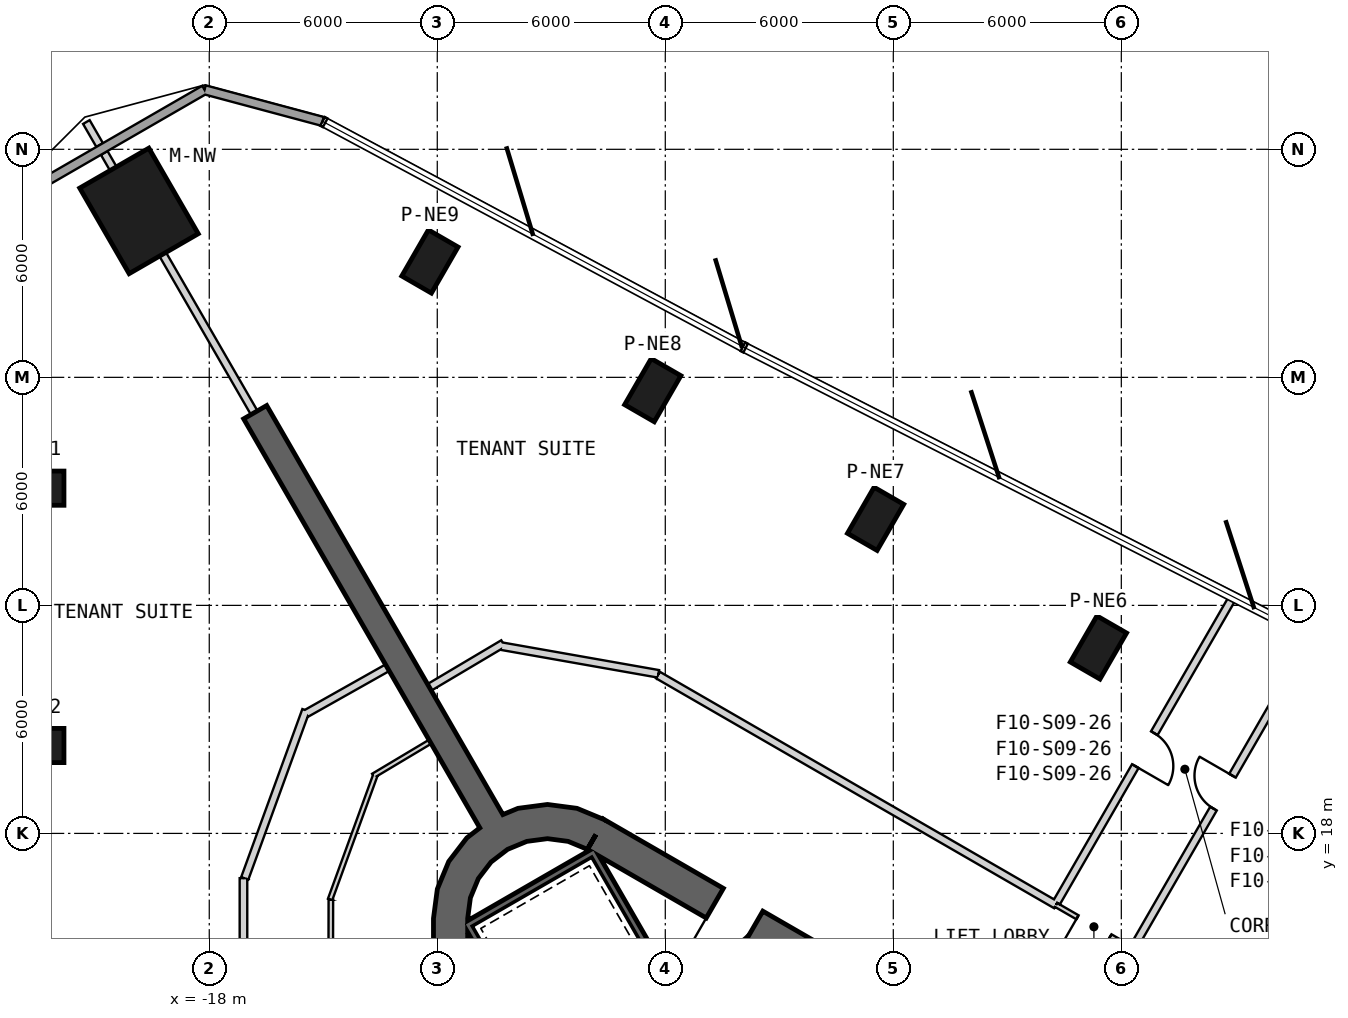
"""IFC4 building model, lengths in metres.
Left out: names, types, materials, properties, quantities, classifications, styles, units other than length and angle.
Written with IfcOpenShell. Run it as: python <this file> out.ifc"""

import sys

from ifc_helpers import new_model, si_unit, direction, frame, frame_2d, origin, origin_2d, place, context, subcontext, project, spatial, polyline, rectangle, outline, extrude, element, fill, save


model = new_model("IFC4")
c1 = context("Model", 3, precision=1e-05, world=origin(), true_north=direction((0.0, 1.0)))
c2 = subcontext(c1, "Body", "Model", "MODEL_VIEW")
j1 = project(units=[si_unit("LENGTHUNIT", "METRE"), si_unit("PLANEANGLEUNIT", "RADIAN")], contexts=[c1])
p1 = place(None, origin())
s1 = spatial("IfcSite", under=j1, at=p1, CompositionType="ELEMENT")
p2 = place(p1, origin())
s2 = spatial("IfcBuilding", under=s1, at=p2, CompositionType="ELEMENT")
p3 = place(p2, frame((0.0, 0.0, 169.2)))
s3 = spatial("IfcBuildingStorey", under=s2, at=p3, CompositionType="ELEMENT", Elevation=169.2)
p4 = place(p3, frame((-19.849, 34.379, 0.0), z_axis=(0.0, 0.0, 1.0), x_axis=(-0.5, 0.866025403784, 0.0)))
e1 = element("IfcColumn", 1, at=p4, inside=s3, PredefinedType="COLUMN", context=c2, shape_type="SweptSolid", body=[
    extrude(rectangle(XDim=2.6, YDim=2.1, at=origin_2d()), origin(), (0.0, 0.0, 1.0), 4.0),
])
for number, where, z_axis, x_axis in (
    (2, (-22.524, 27.084, -0.3), (0.0, 0.0, 1.0), (-1.0, 0.0, 0.0)),
    (3, (-22.524, 20.313, -0.3), (0.0, 0.0, 1.0), (-1.0, 0.0, 0.0)),
    (4, (5.398, 22.892, -0.3), (0.0, 0.0, 1.0), (0.5, 0.866, 0.0)),
    (5, (-0.466, 26.277, -0.3), (0.0, 0.0, 1.0), (0.5, 0.866, 0.0)),
    (6, (-6.33, 29.663, -0.3), (0.0, 0.0, 1.0), (0.5, 0.866, 0.0)),
    (7, (-12.194, 33.048, -0.3), (0.0, 0.0, 1.0), (0.5, 0.866, 0.0)),
):
    element("IfcColumn", number, at=place(p3, frame(where, z_axis=z_axis, x_axis=x_axis)), inside=s3, PredefinedType="COLUMN", context=c2, shape_type="SweptSolid", body=[
        extrude(rectangle(XDim=1.4, YDim=0.9, at=origin_2d()), origin(), (0.0, 0.0, 1.0), 4.3),
    ])
p5 = place(p3, frame((19.475, 2.208, 0.0), z_axis=(0.0, 0.0, 1.0), x_axis=(-0.866028369851, 0.499994862586, 0.0)))
e8 = element("IfcWall", 8, at=p5, inside=s3, PredefinedType="SHEAR", context=c2, shape_type="SweptSolid", body=[
    extrude(rectangle(XDim=31.523, YDim=0.9, at=frame_2d((15.762, 0.0))), origin(), (0.0, 0.0, 1.0), 4.0),
])
p6 = place(p5, frame((7.062, 0.0, 0.0)))
e9 = element("IfcOpeningElement", 9, at=p6, cuts=e8, PredefinedType="OPENING", context=c2, shape_type="SweptSolid", body=[
    extrude(rectangle(XDim=1.2, YDim=2.4, at=frame_2d((0.6, 1.2))), frame((0.0, 0.46, 0.0), z_axis=(0.0, -1.0, 0.0), x_axis=(1.0, 0.0, 0.0)), (0.0, 0.0, 1.0), 0.92),
])
p7 = place(p5, frame((3.612, 0.0, 0.0)))
e10 = element("IfcOpeningElement", 10, at=p7, cuts=e8, PredefinedType="OPENING", context=c2, shape_type="SweptSolid", body=[
    extrude(rectangle(XDim=1.2, YDim=2.4, at=frame_2d((0.6, 1.2))), frame((0.0, 0.46, 0.0), z_axis=(0.0, -1.0, 0.0), x_axis=(1.0, 0.0, 0.0)), (0.0, 0.0, 1.0), 0.92),
])
p8 = place(p5, frame((26.712, 0.0, 0.0)))
e11 = element("IfcOpeningElement", 11, at=p8, cuts=e8, PredefinedType="OPENING", context=c2, shape_type="SweptSolid", body=[
    extrude(rectangle(XDim=1.2, YDim=2.4, at=frame_2d((0.6, 1.2))), frame((0.0, 0.46, 0.0), z_axis=(0.0, -1.0, 0.0), x_axis=(1.0, 0.0, 0.0)), (0.0, 0.0, 1.0), 0.92),
])
p9 = place(p3, frame((-11.65, 15.762, 0.0), z_axis=(0.0, 0.0, 1.0), x_axis=(0.0, -1.0, 0.0)))
e12 = element("IfcWall", 12, at=p9, inside=s3, PredefinedType="SHEAR", context=c2, shape_type="SweptSolid", body=[
    extrude(rectangle(XDim=31.523, YDim=0.9, at=frame_2d((15.762, 0.0))), origin(), (0.0, 0.0, 1.0), 4.0),
])
p10 = place(p9, frame((7.062, 0.0, 0.0)))
e13 = element("IfcOpeningElement", 13, at=p10, cuts=e12, PredefinedType="OPENING", context=c2, shape_type="SweptSolid", body=[
    extrude(rectangle(XDim=1.2, YDim=2.4, at=frame_2d((0.6, 1.2))), frame((0.0, 0.46, 0.0), z_axis=(0.0, -1.0, 0.0), x_axis=(1.0, 0.0, 0.0)), (0.0, 0.0, 1.0), 0.92),
])
p11 = place(p9, frame((9.762, 0.0, 0.0)))
e14 = element("IfcOpeningElement", 14, at=p11, cuts=e12, PredefinedType="OPENING", context=c2, shape_type="SweptSolid", body=[
    extrude(rectangle(XDim=1.2, YDim=2.4, at=frame_2d((0.6, 1.2))), frame((0.0, 0.46, 0.0), z_axis=(0.0, -1.0, 0.0), x_axis=(1.0, 0.0, 0.0)), (0.0, 0.0, 1.0), 0.92),
])
p12 = place(p9, frame((12.462, 0.0, 0.0)))
e15 = element("IfcOpeningElement", 15, at=p12, cuts=e12, PredefinedType="OPENING", context=c2, shape_type="SweptSolid", body=[
    extrude(rectangle(XDim=1.2, YDim=2.4, at=frame_2d((0.6, 1.2))), frame((0.0, 0.46, 0.0), z_axis=(0.0, -1.0, 0.0), x_axis=(1.0, 0.0, 0.0)), (0.0, 0.0, 1.0), 0.92),
])
p13 = place(p9, frame((15.162, 0.0, 0.0)))
e16 = element("IfcOpeningElement", 16, at=p13, cuts=e12, PredefinedType="OPENING", context=c2, shape_type="SweptSolid", body=[
    extrude(rectangle(XDim=1.2, YDim=2.4, at=frame_2d((0.6, 1.2))), frame((0.0, 0.46, 0.0), z_axis=(0.0, -1.0, 0.0), x_axis=(1.0, 0.0, 0.0)), (0.0, 0.0, 1.0), 0.92),
])
p14 = place(p9, frame((17.862, 0.0, 0.0)))
e17 = element("IfcOpeningElement", 17, at=p14, cuts=e12, PredefinedType="OPENING", context=c2, shape_type="SweptSolid", body=[
    extrude(rectangle(XDim=1.2, YDim=2.4, at=frame_2d((0.6, 1.2))), frame((0.0, 0.46, 0.0), z_axis=(0.0, -1.0, 0.0), x_axis=(1.0, 0.0, 0.0)), (0.0, 0.0, 1.0), 0.92),
])
p15 = place(p9, frame((20.562, 0.0, 0.0)))
e18 = element("IfcOpeningElement", 18, at=p15, cuts=e12, PredefinedType="OPENING", context=c2, shape_type="SweptSolid", body=[
    extrude(rectangle(XDim=1.2, YDim=2.4, at=frame_2d((0.6, 1.2))), frame((0.0, 0.46, 0.0), z_axis=(0.0, -1.0, 0.0), x_axis=(1.0, 0.0, 0.0)), (0.0, 0.0, 1.0), 0.92),
])
p16 = place(p9, frame((23.262, 0.0, 0.0)))
e19 = element("IfcOpeningElement", 19, at=p16, cuts=e12, PredefinedType="OPENING", context=c2, shape_type="SweptSolid", body=[
    extrude(rectangle(XDim=1.2, YDim=2.4, at=frame_2d((0.6, 1.2))), frame((0.0, 0.46, 0.0), z_axis=(0.0, -1.0, 0.0), x_axis=(1.0, 0.0, 0.0)), (0.0, 0.0, 1.0), 0.92),
])
p17 = place(p9, frame((3.612, 0.0, 0.0)))
e20 = element("IfcOpeningElement", 20, at=p17, cuts=e12, PredefinedType="OPENING", context=c2, shape_type="SweptSolid", body=[
    extrude(rectangle(XDim=1.2, YDim=2.4, at=frame_2d((0.6, 1.2))), frame((0.0, 0.46, 0.0), z_axis=(0.0, -1.0, 0.0), x_axis=(1.0, 0.0, 0.0)), (0.0, 0.0, 1.0), 0.92),
])
p18 = place(p9, frame((26.712, 0.0, 0.0)))
e21 = element("IfcOpeningElement", 21, at=p18, cuts=e12, PredefinedType="OPENING", context=c2, shape_type="SweptSolid", body=[
    extrude(rectangle(XDim=1.2, YDim=2.4, at=frame_2d((0.6, 1.2))), frame((0.0, 0.46, 0.0), z_axis=(0.0, -1.0, 0.0), x_axis=(1.0, 0.0, 0.0)), (0.0, 0.0, 1.0), 0.92),
])
p19 = place(p3, origin())
e22 = element("IfcWall", 22, at=p19, inside=s3, PredefinedType="SHEAR", context=c2, shape_type="SweptSolid", body=[
    extrude(outline(polyline([(-7.6, 18.36), (-8.323, 18.659), (-9.1, 18.762), (-9.876, 18.659), (-10.6, 18.36), (-11.221, 17.883), (-11.698, 17.262), (-11.998, 16.538), (-12.1, 15.762), (-11.2, 15.762), (-11.128, 16.305), (-10.919, 16.812), (-10.585, 17.247), (-10.15, 17.58), (-9.644, 17.79), (-9.1, 17.862), (-8.556, 17.79), (-8.05, 17.58), (-7.6, 18.36)])), origin(), (0.0, 0.0, 1.0), 4.0),
])
p20 = place(p3, frame((-10.575, 18.316, 0.0), z_axis=(0.0, 0.0, 1.0), x_axis=(-0.499995558535, 0.86602796805, 0.0)))
e23 = element("IfcWall", 23, at=p20, inside=s3, PredefinedType="SHEAR", context=c2, shape_type="SweptSolid", body=[
    extrude(rectangle(XDim=12.433, YDim=0.7, at=frame_2d((6.216, 0.0))), origin(), (0.0, 0.0, 1.0), 4.0),
])
p21 = place(p3, frame((-15.02, 36.735, 0.0), z_axis=(0.0, 0.0, 1.0), x_axis=(-0.965921607741, 0.258834788424, 0.0)))
e24 = element("IfcWall", 24, at=p21, inside=s3, PredefinedType="SOLIDWALL", context=c2, shape_type="SweptSolid", body=[
    extrude(rectangle(XDim=3.215, YDim=0.24, at=frame_2d((1.607, 0.0))), origin(), (0.0, 0.0, 1.0), 3.7),
])
p22 = place(p3, frame((-18.125, 37.567, 0.0), z_axis=(0.0, 0.0, 1.0), x_axis=(-0.866030202489, -0.499991688307, 0.0)))
e25 = element("IfcWall", 25, at=p22, inside=s3, PredefinedType="SOLIDWALL", context=c2, shape_type="SweptSolid", body=[
    extrude(rectangle(XDim=6.175, YDim=0.24, at=frame_2d((3.087, 0.0))), origin(), (0.0, 0.0, 1.0), 3.7),
])
p23 = place(p3, frame((-11.245, 15.678, -0.3), z_axis=(0.0, 0.0, 1.0), x_axis=(0.499977274689, -0.866038523851, 0.0)))
e26 = element("IfcWall", 26, at=p23, inside=s3, PredefinedType="SHEAR", context=c2, shape_type="SweptSolid", body=[
    extrude(rectangle(XDim=8.1, YDim=0.2, at=frame_2d((4.05, 0.0))), origin(), (0.0, 0.0, 1.0), 4.0),
])
p24 = place(p3, frame((-7.818, 17.541, -0.3), z_axis=(0.0, 0.0, 1.0), x_axis=(-0.866044365799, -0.499967155389, 0.0)))
e27 = element("IfcWall", 27, at=p24, inside=s3, PredefinedType="SHEAR", context=c2, shape_type="SweptSolid", body=[
    extrude(rectangle(XDim=3.8, YDim=0.2, at=frame_2d((1.9, 0.0))), origin(), (0.0, 0.0, 1.0), 4.0),
])
p25 = place(p3, frame((-7.854, 17.405, -0.3), z_axis=(0.0, 0.0, 1.0), x_axis=(0.499997992926, -0.866026562566, 0.0)))
e28 = element("IfcWall", 28, at=p25, inside=s3, PredefinedType="SHEAR", context=c2, shape_type="SweptSolid", body=[
    extrude(rectangle(XDim=7.9, YDim=0.2, at=frame_2d((3.95, 0.0))), origin(), (0.0, 0.0, 1.0), 4.0),
])
p26 = place(p3, frame((-12.189, 20.411, 0.0), z_axis=(0.0, 0.0, 1.0), x_axis=(-0.858492721014, -0.51282574815, 0.0)))
e29 = element("IfcWall", 29, at=p26, inside=s3, PredefinedType="PARTITIONING", context=c2, shape_type="SweptSolid", body=[
    extrude(rectangle(XDim=1.742, YDim=0.12, at=frame_2d((0.871, 0.0))), origin(), (0.0, 0.0, 1.0), 3.7),
])
p27 = place(p3, frame((-13.631, 19.53, 0.0), z_axis=(0.0, 0.0, 1.0), x_axis=(-0.342069878069, -0.939674517329, 0.0)))
e30 = element("IfcWall", 30, at=p27, inside=s3, PredefinedType="PARTITIONING", context=c2, shape_type="SweptSolid", body=[
    extrude(rectangle(XDim=3.479, YDim=0.12, at=frame_2d((1.739, 0.0))), origin(), (0.0, 0.0, 1.0), 2.78),
])
p28 = place(p3, frame((-14.8, 16.257, 0.0), z_axis=(0.0, 0.0, 1.0), x_axis=(-0.001847148781, -0.999998294019, 0.0)))
e31 = element("IfcWall", 31, at=p28, inside=s3, PredefinedType="PARTITIONING", context=c2, shape_type="SweptSolid", body=[
    extrude(rectangle(XDim=16.257, YDim=0.12, at=frame_2d((8.128, 0.0))), origin(), (0.0, 0.0, 1.0), 2.88),
])
p29 = place(p28, frame((7.629, 0.0, 0.0)))
e32 = element("IfcOpeningElement", 32, at=p29, cuts=e31, PredefinedType="OPENING", context=c2, shape_type="SweptSolid", body=[
    extrude(rectangle(XDim=1.0, YDim=2.1, at=frame_2d((0.5, 1.05))), frame((0.0, 0.07, 0.0), z_axis=(0.0, -1.0, 0.0), x_axis=(1.0, 0.0, 0.0)), (0.0, 0.0, 1.0), 0.14),
])
p30 = place(p3, frame((-17.1, 16.823, 0.0), z_axis=(0.0, 0.0, 1.0), x_axis=(0.0, -1.0, 0.0)))
e33 = element("IfcWall", 33, at=p30, inside=s3, PredefinedType="PARTITIONING", context=c2, shape_type="SweptSolid", body=[
    extrude(rectangle(XDim=12.473, YDim=0.2, at=frame_2d((6.236, 0.0))), origin(), (0.0, 0.0, 1.0), 2.88),
])
p31 = place(p30, frame((5.776, 0.0, 0.0)))
e34 = element("IfcOpeningElement", 34, at=p31, cuts=e33, PredefinedType="OPENING", context=c2, shape_type="SweptSolid", body=[
    extrude(rectangle(XDim=1.0, YDim=2.1, at=frame_2d((0.5, 1.05))), frame((0.0, 0.11, 0.0), z_axis=(0.0, -1.0, 0.0), x_axis=(1.0, 0.0, 0.0)), (0.0, 0.0, 1.0), 0.22),
])
p32 = place(p3, frame((-15.456, 21.239, 0.0), z_axis=(0.0, 0.0, 1.0), x_axis=(-0.34205546997, -0.939679762187, 0.0)))
e35 = element("IfcWall", 35, at=p32, inside=s3, PredefinedType="PARTITIONING", context=c2, shape_type="SweptSolid", body=[
    extrude(rectangle(XDim=4.706, YDim=0.2, at=frame_2d((2.353, 0.0))), origin(), (0.0, 0.0, 1.0), 2.78),
])
p33 = place(p3, frame((-13.313, 22.359, 0.0), z_axis=(0.0, 0.0, 1.0), x_axis=(-0.87121710687, -0.490897904555, 0.0)))
e36 = element("IfcWall", 36, at=p33, inside=s3, PredefinedType="PARTITIONING", context=c2, shape_type="SweptSolid", body=[
    extrude(rectangle(XDim=2.457, YDim=0.2, at=frame_2d((1.229, 0.0))), origin(), (0.0, 0.0, 1.0), 3.7),
])
p34 = place(p3, frame((6.275, 14.968, 0.0), z_axis=(0.0, 0.0, 1.0), x_axis=(-0.866053019151, 0.499952165731, 0.0)))
e37 = element("IfcWall", 37, at=p34, inside=s3, PredefinedType="PARTITIONING", context=c2, shape_type="SweptSolid", body=[
    extrude(rectangle(XDim=2.3, YDim=0.12, at=frame_2d((1.15, 0.0))), origin(), (0.0, 0.0, 1.0), 3.7),
])
p35 = place(p34, frame((0.65, 0.0, 0.0)))
e38 = element("IfcOpeningElement", 38, at=p35, cuts=e37, PredefinedType="OPENING", context=c2, shape_type="SweptSolid", body=[
    extrude(rectangle(XDim=1.0, YDim=2.1, at=frame_2d((0.5, 1.05))), frame((0.0, 0.07, 0.0), z_axis=(0.0, -1.0, 0.0), x_axis=(1.0, 0.0, 0.0)), (0.0, 0.0, 1.0), 0.14),
])
p36 = place(p3, frame((-10.265, 22.996, 0.0), z_axis=(0.0, 0.0, 1.0), x_axis=(-0.859934823121, -0.510403859687, 0.0)))
e39 = element("IfcWall", 39, at=p36, inside=s3, PredefinedType="PARTITIONING", context=c2, shape_type="SweptSolid", body=[
    extrude(rectangle(XDim=2.258, YDim=0.2, at=frame_2d((1.129, 0.0))), origin(), (0.0, 0.0, 1.0), 3.7),
])
p37 = place(p3, frame((-6.181, 22.199, 0.0), z_axis=(0.0, 0.0, 1.0), x_axis=(-0.984807544765, 0.17364935869, 0.0)))
e40 = element("IfcWall", 40, at=p37, inside=s3, PredefinedType="PARTITIONING", context=c2, shape_type="SweptSolid", body=[
    extrude(rectangle(XDim=4.199, YDim=0.2, at=frame_2d((2.1, 0.0))), origin(), (0.0, 0.0, 1.0), 2.78),
])
p38 = place(p3, frame((4.283, 16.118, 0.0), z_axis=(0.0, 0.0, 1.0), x_axis=(-0.866016186489, 0.500015964484, 0.0)))
e41 = element("IfcWall", 41, at=p38, inside=s3, PredefinedType="PARTITIONING", context=c2, shape_type="SweptSolid", body=[
    extrude(rectangle(XDim=12.096, YDim=0.2, at=frame_2d((6.048, 0.0))), origin(), (0.0, 0.0, 1.0), 2.88),
])
p39 = place(p3, frame((-16.817, 29.068, 0.0), z_axis=(0.0, 0.0, 1.0), x_axis=(-0.499988695522, 0.866031930329, 0.0)))
e42 = element("IfcWall", 42, at=p39, inside=s3, PredefinedType="PARTITIONING", context=c2, shape_type="SweptSolid", body=[
    extrude(rectangle(XDim=4.815, YDim=0.2, at=frame_2d((2.408, 0.0))), origin(), (0.0, 0.0, 1.0), 3.27),
])
p40 = place(p3, frame((-20.525, 35.49, 0.0), z_axis=(0.0, 0.0, 1.0), x_axis=(-0.499869636591, 0.866100656052, 0.0)))
e43 = element("IfcWall", 43, at=p40, inside=s3, PredefinedType="PARTITIONING", context=c2, shape_type="SweptSolid", body=[
    extrude(rectangle(XDim=0.479, YDim=0.2, at=frame_2d((0.239, 0.0))), origin(), (0.0, 0.0, 1.0), 3.7),
])
p41 = place(p3, frame((-20.884, 36.113, 0.0), z_axis=(0.0, 0.0, 1.0), x_axis=(-0.49989369433, 0.866086770693, 0.0)))
e44 = element("IfcWall", 44, at=p41, inside=s3, PredefinedType="PARTITIONING", context=c2, shape_type="SweptSolid", body=[
    extrude(rectangle(XDim=0.699, YDim=0.2, at=frame_2d((0.35, 0.0))), origin(), (0.0, 0.0, 1.0), 3.7),
])
p42 = place(p3, frame((8.941, 24.227, 0.0), z_axis=(0.0, 0.0, 1.0), x_axis=(-0.500002216581, -0.866024124037, 0.0)))
e45 = element("IfcWall", 45, at=p42, inside=s3, PredefinedType="PARTITIONING", context=c2, shape_type="SweptSolid", body=[
    extrude(rectangle(XDim=9.292, YDim=0.2, at=frame_2d((4.646, 0.0))), origin(), (0.0, 0.0, 1.0), 3.7),
])
p43 = place(p42, frame((4.146, 0.0, 0.0)))
e46 = element("IfcOpeningElement", 46, at=p43, cuts=e45, PredefinedType="OPENING", context=c2, shape_type="SweptSolid", body=[
    extrude(rectangle(XDim=1.0, YDim=2.1, at=frame_2d((0.5, 1.05))), frame((0.0, 0.11, 0.0), z_axis=(0.0, -1.0, 0.0), x_axis=(1.0, 0.0, 0.0)), (0.0, 0.0, 1.0), 0.22),
])
p44 = place(p3, frame((6.322, 15.01, 0.0), z_axis=(0.0, 0.0, 1.0), x_axis=(0.500005339912, 0.866022320763, 0.0)))
e47 = element("IfcWall", 47, at=p44, inside=s3, PredefinedType="PARTITIONING", context=c2, shape_type="SweptSolid", body=[
    extrude(rectangle(XDim=9.413, YDim=0.2, at=frame_2d((4.707, 0.0))), origin(), (0.0, 0.0, 1.0), 3.7),
])
p45 = place(p44, frame((4.207, 0.0, 0.0)))
e48 = element("IfcOpeningElement", 48, at=p45, cuts=e47, PredefinedType="OPENING", context=c2, shape_type="SweptSolid", body=[
    extrude(rectangle(XDim=1.0, YDim=2.1, at=frame_2d((0.5, 1.05))), frame((0.0, 0.11, 0.0), z_axis=(0.0, -1.0, 0.0), x_axis=(1.0, 0.0, 0.0)), (0.0, 0.0, 1.0), 0.22),
])
p46 = place(p35, origin())
e49 = element("IfcDoor", 49, at=p46, inside=s3, OperationType="SINGLE_SWING_RIGHT", PredefinedType="NOTDEFINED", context=c2, shape_type="SweptSolid", body=[
    extrude(rectangle(XDim=1.0, YDim=2.1, at=frame_2d((0.5, 1.05))), frame((0.0, 0.025, 0.0), z_axis=(0.0, -1.0, 0.0), x_axis=(1.0, 0.0, 0.0)), (0.0, 0.0, 1.0), 0.05),
])
fill(e38, e49)
p47 = place(p43, origin())
e50 = element("IfcDoor", 50, at=p47, inside=s3, OperationType="SINGLE_SWING_LEFT", PredefinedType="USERDEFINED", context=c2, shape_type="SweptSolid", body=[
    extrude(rectangle(XDim=1.0, YDim=2.1, at=frame_2d((0.5, 1.05))), frame((0.0, 0.025, 0.0), z_axis=(0.0, -1.0, 0.0), x_axis=(1.0, 0.0, 0.0)), (0.0, 0.0, 1.0), 0.05),
])
fill(e46, e50)
p48 = place(p45, origin())
e51 = element("IfcDoor", 51, at=p48, inside=s3, OperationType="SINGLE_SWING_RIGHT", PredefinedType="USERDEFINED", context=c2, shape_type="SweptSolid", body=[
    extrude(rectangle(XDim=1.0, YDim=2.1, at=frame_2d((0.5, 1.05))), frame((0.0, 0.025, 0.0), z_axis=(0.0, -1.0, 0.0), x_axis=(1.0, 0.0, 0.0)), (0.0, 0.0, 1.0), 0.05),
])
fill(e48, e51)
p49 = place(p8, origin())
e52 = element("IfcDoor", 52, at=p49, inside=s3, OperationType="SINGLE_SWING_LEFT", PredefinedType="USERDEFINED", context=c2, shape_type="SweptSolid", body=[
    extrude(rectangle(XDim=1.2, YDim=2.4, at=frame_2d((0.6, 1.2))), frame((0.0, 0.025, 0.0), z_axis=(0.0, -1.0, 0.0), x_axis=(1.0, 0.0, 0.0)), (0.0, 0.0, 1.0), 0.05),
])
fill(e11, e52)
save(model, sys.argv[1])
